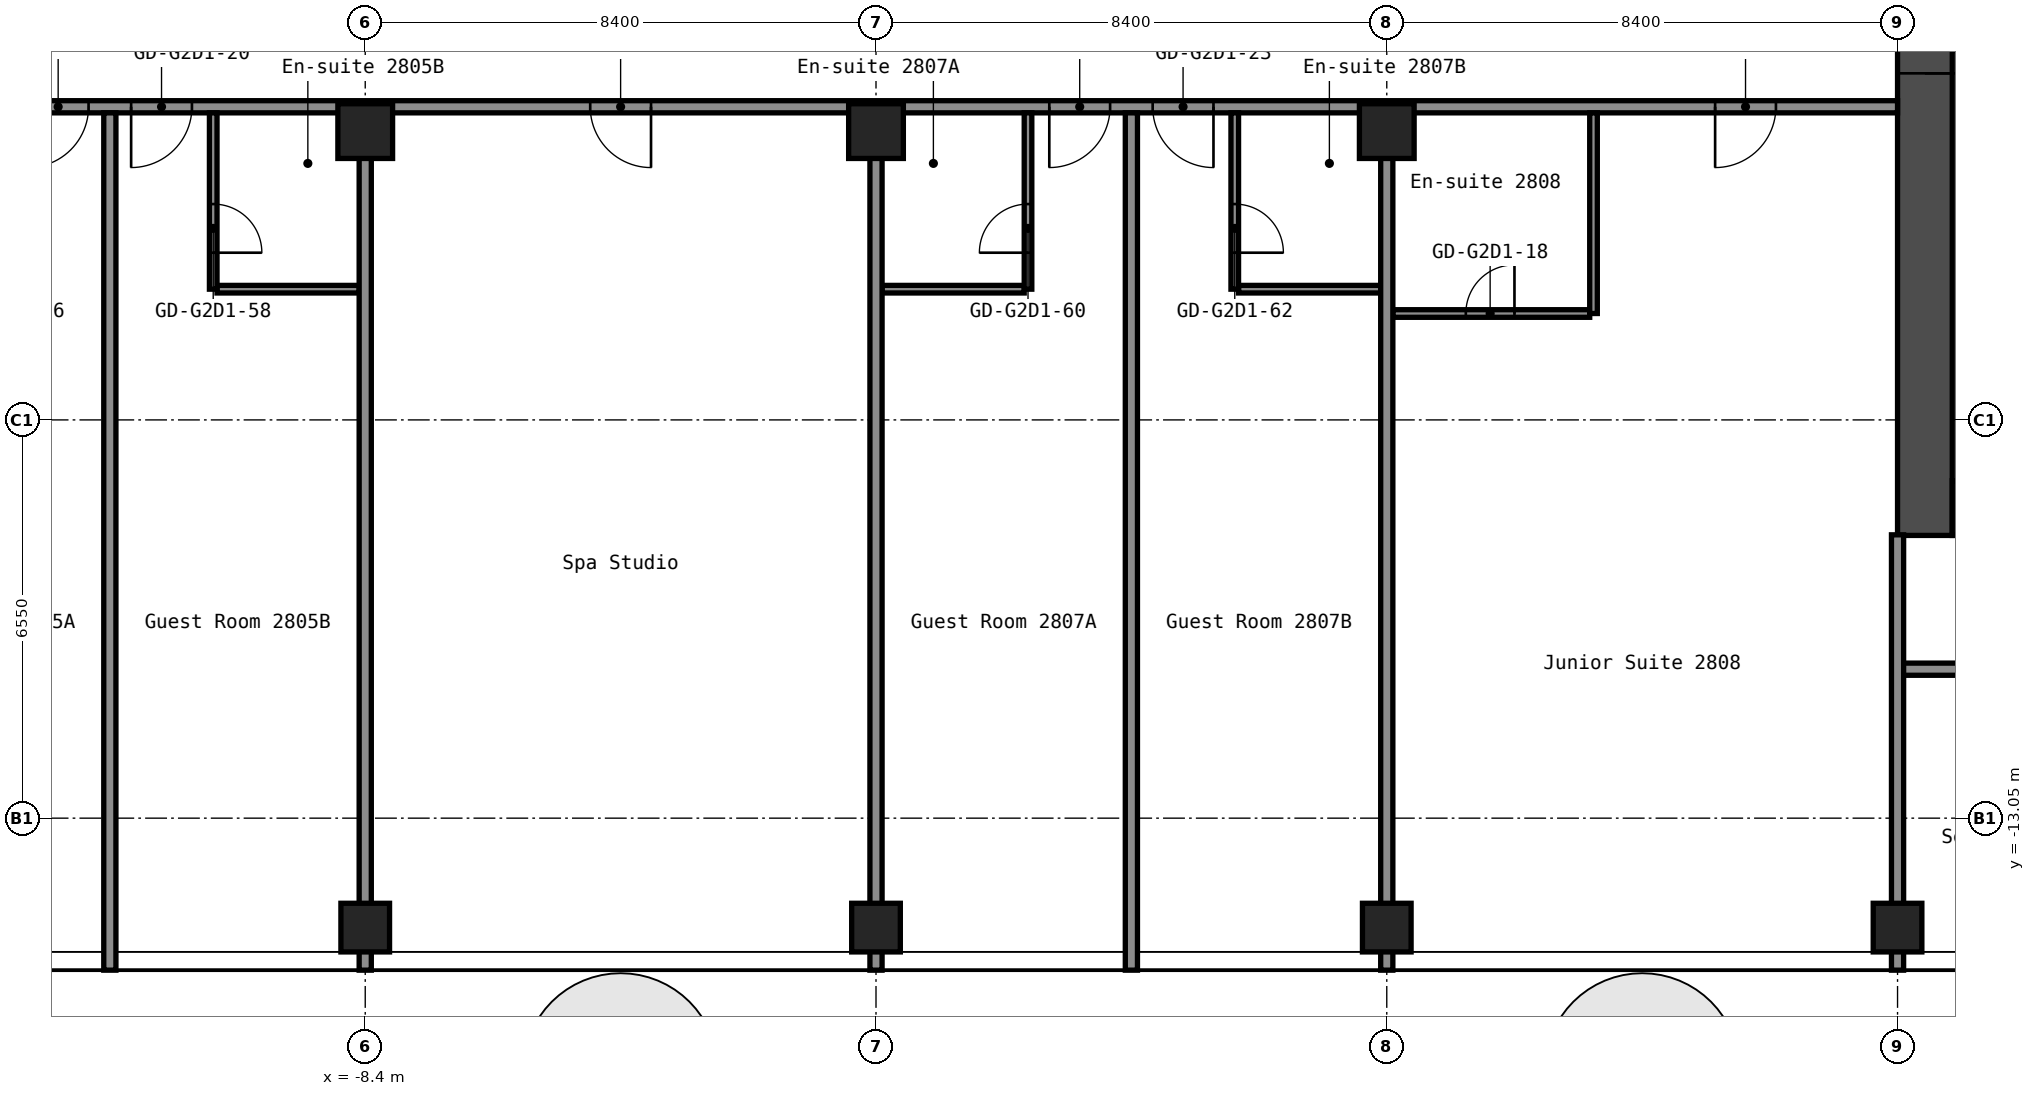
"""IFC4 building model, lengths in metres.
Left out: names, types, materials, properties, quantities, classifications, styles, units other than length and angle.
Written with IfcOpenShell. Run it as: python <this file> out.ifc"""

import sys

from ifc_helpers import new_model, si_unit, direction, frame, frame_2d, origin, origin_2d, place, context, subcontext, project, spatial, rectangle, hollow_rectangle, extrude, element, fill, save


model = new_model("IFC4")
c1 = context("Model", 3, precision=1e-05, world=origin(), true_north=direction((0.0, 1.0)))
c2 = subcontext(c1, "Body", "Model", "MODEL_VIEW")
j1 = project(units=[si_unit("LENGTHUNIT", "METRE"), si_unit("PLANEANGLEUNIT", "RADIAN")], contexts=[c1])
p1 = place(None, origin())
s1 = spatial("IfcSite", under=j1, at=p1, CompositionType="ELEMENT")
p2 = place(p1, origin())
s2 = spatial("IfcBuilding", under=s1, at=p2, CompositionType="ELEMENT")
p3 = place(p2, frame((0.0, 0.0, 101.0)))
s3 = spatial("IfcBuildingStorey", under=s2, at=p3, CompositionType="ELEMENT", Elevation=101.0)
p4 = place(p3, frame((-8.4, -14.85, 0.0), z_axis=(0.0, 0.0, 1.0), x_axis=(1.0, 0.0, 0.0)))
e1 = element("IfcColumn", 1, at=p4, inside=s3, PredefinedType="COLUMN", context=c2, shape_type="SweptSolid", body=[
    extrude(hollow_rectangle(XDim=0.8, YDim=0.8, WallThickness=0.032, at=origin_2d()), origin(), (0.0, 0.0, 1.0), 2.8),
])
p5 = place(p3, frame((-8.4, -1.75, 0.0), z_axis=(0.0, 0.0, 1.0), x_axis=(1.0, 0.0, 0.0)))
e2 = element("IfcColumn", 2, at=p5, inside=s3, PredefinedType="COLUMN", context=c2, shape_type="SweptSolid", body=[
    extrude(hollow_rectangle(XDim=0.9, YDim=0.9, WallThickness=0.036, at=origin_2d()), origin(), (0.0, 0.0, 1.0), 2.8),
])
p6 = place(p3, frame((0.0, -14.85, 0.0), z_axis=(0.0, 0.0, 1.0), x_axis=(1.0, 0.0, 0.0)))
e3 = element("IfcColumn", 3, at=p6, inside=s3, PredefinedType="COLUMN", context=c2, shape_type="SweptSolid", body=[
    extrude(hollow_rectangle(XDim=0.8, YDim=0.8, WallThickness=0.032, at=origin_2d()), origin(), (0.0, 0.0, 1.0), 2.8),
])
p7 = place(p3, frame((0.0, -1.75, 0.0), z_axis=(0.0, 0.0, 1.0), x_axis=(1.0, 0.0, 0.0)))
e4 = element("IfcColumn", 4, at=p7, inside=s3, PredefinedType="COLUMN", context=c2, shape_type="SweptSolid", body=[
    extrude(hollow_rectangle(XDim=0.9, YDim=0.9, WallThickness=0.036, at=origin_2d()), origin(), (0.0, 0.0, 1.0), 2.8),
])
p8 = place(p3, frame((8.4, -14.85, 0.0), z_axis=(0.0, 0.0, 1.0), x_axis=(1.0, 0.0, 0.0)))
e5 = element("IfcColumn", 5, at=p8, inside=s3, PredefinedType="COLUMN", context=c2, shape_type="SweptSolid", body=[
    extrude(hollow_rectangle(XDim=0.8, YDim=0.8, WallThickness=0.032, at=origin_2d()), origin(), (0.0, 0.0, 1.0), 2.8),
])
p9 = place(p3, frame((8.4, -1.75, 0.0), z_axis=(0.0, 0.0, 1.0), x_axis=(1.0, 0.0, 0.0)))
e6 = element("IfcColumn", 6, at=p9, inside=s3, PredefinedType="COLUMN", context=c2, shape_type="SweptSolid", body=[
    extrude(hollow_rectangle(XDim=0.9, YDim=0.9, WallThickness=0.036, at=origin_2d()), origin(), (0.0, 0.0, 1.0), 2.8),
])
p10 = place(p3, frame((16.8, -14.85, 0.0), z_axis=(0.0, 0.0, 1.0), x_axis=(1.0, 0.0, 0.0)))
e7 = element("IfcColumn", 7, at=p10, inside=s3, PredefinedType="COLUMN", context=c2, shape_type="SweptSolid", body=[
    extrude(hollow_rectangle(XDim=0.8, YDim=0.8, WallThickness=0.032, at=origin_2d()), origin(), (0.0, 0.0, 1.0), 2.8),
])
p11 = place(p3, frame((17.25, -8.4, 0.0), z_axis=(0.0, 0.0, 1.0), x_axis=(0.0, 1.0, 0.0)))
e8 = element("IfcWall", 8, at=p11, inside=s3, PredefinedType="SHEAR", context=c2, shape_type="SweptSolid", body=[
    extrude(rectangle(XDim=16.8, YDim=0.9, at=frame_2d((8.4, 0.0))), origin(), (0.0, 0.0, 1.0), 2.8),
])
p12 = place(p11, frame((7.6, 0.0, 0.0)))
e9 = element("IfcOpeningElement", 9, at=p12, cuts=e8, PredefinedType="OPENING", context=c2, shape_type="SweptSolid", body=[
    extrude(rectangle(XDim=1.2, YDim=2.1, at=frame_2d((0.6, 1.05))), frame((0.0, 0.46, 0.0), z_axis=(0.0, -1.0, 0.0), x_axis=(1.0, 0.0, 0.0)), (0.0, 0.0, 1.0), 0.92),
])
p13 = place(p3, frame((17.7, -7.95, 0.0), z_axis=(0.0, 0.0, 1.0), x_axis=(1.0, 0.0, 0.0)))
e10 = element("IfcWall", 10, at=p13, inside=s3, PredefinedType="SHEAR", context=c2, shape_type="SweptSolid", body=[
    extrude(rectangle(XDim=15.0, YDim=0.9, at=frame_2d((7.5, 0.0))), origin(), (0.0, 0.0, 1.0), 2.8),
])
p14 = place(p13, frame((2.55, 0.0, 0.0)))
e11 = element("IfcOpeningElement", 11, at=p14, cuts=e10, PredefinedType="OPENING", context=c2, shape_type="SweptSolid", body=[
    extrude(rectangle(XDim=1.0, YDim=2.1, at=frame_2d((0.5, 1.05))), frame((0.0, 0.46, 0.0), z_axis=(0.0, -1.0, 0.0), x_axis=(1.0, 0.0, 0.0)), (0.0, 0.0, 1.0), 0.92),
])
p15 = place(p3, frame((16.8, -10.6, 0.0), z_axis=(0.0, 0.0, 1.0), x_axis=(1.0, 0.0, 0.0)))
e12 = element("IfcWall", 12, at=p15, inside=s3, PredefinedType="PARTITIONING", context=c2, shape_type="SweptSolid", body=[
    extrude(rectangle(XDim=29.7, YDim=0.2, at=frame_2d((14.85, 0.0))), origin(), (0.0, 0.0, 1.0), 2.8),
])
p16 = place(p15, frame((2.24, 0.0, 0.0)))
e13 = element("IfcOpeningElement", 13, at=p16, cuts=e12, PredefinedType="OPENING", context=c2, shape_type="SweptSolid", body=[
    extrude(rectangle(XDim=0.9, YDim=2.1, at=frame_2d((0.45, 1.05))), frame((0.0, 0.11, 0.0), z_axis=(0.0, -1.0, 0.0), x_axis=(1.0, 0.0, 0.0)), (0.0, 0.0, 1.0), 0.22),
])
p17 = place(p15, frame((6.44, 0.0, 0.0)))
e14 = element("IfcOpeningElement", 14, at=p17, cuts=e12, PredefinedType="OPENING", context=c2, shape_type="SweptSolid", body=[
    extrude(rectangle(XDim=0.9, YDim=2.1, at=frame_2d((0.45, 1.05))), frame((0.0, 0.11, 0.0), z_axis=(0.0, -1.0, 0.0), x_axis=(1.0, 0.0, 0.0)), (0.0, 0.0, 1.0), 0.22),
])
p18 = place(p15, frame((9.8, 0.0, 0.0)))
e15 = element("IfcOpeningElement", 15, at=p18, cuts=e12, PredefinedType="OPENING", context=c2, shape_type="SweptSolid", body=[
    extrude(rectangle(XDim=0.9, YDim=2.1, at=frame_2d((0.45, 1.05))), frame((0.0, 0.11, 0.0), z_axis=(0.0, -1.0, 0.0), x_axis=(1.0, 0.0, 0.0)), (0.0, 0.0, 1.0), 0.22),
])
p19 = place(p15, frame((14.0, 0.0, 0.0)))
e16 = element("IfcOpeningElement", 16, at=p19, cuts=e12, PredefinedType="OPENING", context=c2, shape_type="SweptSolid", body=[
    extrude(rectangle(XDim=0.9, YDim=2.1, at=frame_2d((0.45, 1.05))), frame((0.0, 0.11, 0.0), z_axis=(0.0, -1.0, 0.0), x_axis=(1.0, 0.0, 0.0)), (0.0, 0.0, 1.0), 0.22),
])
p20 = place(p15, frame((17.945, 0.0, 0.0)))
e17 = element("IfcOpeningElement", 17, at=p20, cuts=e12, PredefinedType="OPENING", context=c2, shape_type="SweptSolid", body=[
    extrude(rectangle(XDim=0.9, YDim=2.1, at=frame_2d((0.45, 1.05))), frame((0.0, 0.11, 0.0), z_axis=(0.0, -1.0, 0.0), x_axis=(1.0, 0.0, 0.0)), (0.0, 0.0, 1.0), 0.22),
])
p21 = place(p15, frame((22.145, 0.0, 0.0)))
e18 = element("IfcOpeningElement", 18, at=p21, cuts=e12, PredefinedType="OPENING", context=c2, shape_type="SweptSolid", body=[
    extrude(rectangle(XDim=0.9, YDim=2.1, at=frame_2d((0.45, 1.05))), frame((0.0, 0.11, 0.0), z_axis=(0.0, -1.0, 0.0), x_axis=(1.0, 0.0, 0.0)), (0.0, 0.0, 1.0), 0.22),
])
p22 = place(p15, frame((26.85, 0.0, 0.0)))
e19 = element("IfcOpeningElement", 19, at=p22, cuts=e12, PredefinedType="OPENING", context=c2, shape_type="SweptSolid", body=[
    extrude(rectangle(XDim=0.9, YDim=2.1, at=frame_2d((0.45, 1.05))), frame((0.0, 0.11, 0.0), z_axis=(0.0, -1.0, 0.0), x_axis=(1.0, 0.0, 0.0)), (0.0, 0.0, 1.0), 0.22),
])
p23 = place(p3, frame((8.5, -4.75, 0.0), z_axis=(0.0, 0.0, 1.0), x_axis=(1.0, 0.0, 0.0)))
e20 = element("IfcWall", 20, at=p23, inside=s3, PredefinedType="PARTITIONING", context=c2, shape_type="SweptSolid", body=[
    extrude(rectangle(XDim=3.238, YDim=0.125, at=frame_2d((1.619, 0.0))), origin(), (0.0, 0.0, 1.0), 2.8),
])
p24 = place(p23, frame((1.2, 0.0, 0.0)))
e21 = element("IfcOpeningElement", 21, at=p24, cuts=e20, PredefinedType="OPENING", context=c2, shape_type="SweptSolid", body=[
    extrude(rectangle(XDim=0.8, YDim=2.1, at=frame_2d((0.4, 1.05))), frame((0.0, 0.073, 0.0), z_axis=(0.0, -1.0, 0.0), x_axis=(1.0, 0.0, 0.0)), (0.0, 0.0, 1.0), 0.145),
])
for number, where, z_axis, x_axis in (
    (22, (-10.837, -4.35, 0.0), (0.0, 0.0, 1.0), (1.0, 0.0, 0.0)),
    (23, (0.1, -4.35, 0.0), (0.0, 0.0, 1.0), (1.0, 0.0, 0.0)),
):
    element("IfcWall", number, at=place(p3, frame(where, z_axis=z_axis, x_axis=x_axis)), inside=s3, PredefinedType="PARTITIONING", context=c2, shape_type="SweptSolid", body=[
        extrude(rectangle(XDim=2.337, YDim=0.125, at=frame_2d((1.169, 0.0))), origin(), (0.0, 0.0, 1.0), 2.8),
    ])
p25 = place(p3, frame((5.962, -4.35, 0.0), z_axis=(0.0, 0.0, 1.0), x_axis=(1.0, 0.0, 0.0)))
e24 = element("IfcWall", 24, at=p25, inside=s3, PredefinedType="PARTITIONING", context=c2, shape_type="SweptSolid", body=[
    extrude(rectangle(XDim=2.338, YDim=0.125, at=frame_2d((1.169, 0.0))), origin(), (0.0, 0.0, 1.0), 2.8),
])
p26 = place(p3, frame((-16.8, -1.35, 0.0), z_axis=(0.0, 0.0, 1.0), x_axis=(1.0, 0.0, 0.0)))
e25 = element("IfcWall", 25, at=p26, inside=s3, PredefinedType="PARTITIONING", context=c2, shape_type="SweptSolid", body=[
    extrude(rectangle(XDim=33.6, YDim=0.2, at=frame_2d((16.8, 0.0))), origin(), (0.0, 0.0, 1.0), 2.8),
])
p27 = place(p26, frame((2.85, 0.0, 0.0)))
e26 = element("IfcOpeningElement", 26, at=p27, cuts=e25, PredefinedType="OPENING", context=c2, shape_type="SweptSolid", body=[
    extrude(rectangle(XDim=1.0, YDim=2.1, at=frame_2d((0.5, 1.05))), frame((0.0, 0.11, 0.0), z_axis=(0.0, -1.0, 0.0), x_axis=(1.0, 0.0, 0.0)), (0.0, 0.0, 1.0), 0.22),
])
p28 = place(p26, frame((4.55, 0.0, 0.0)))
e27 = element("IfcOpeningElement", 27, at=p28, cuts=e25, PredefinedType="OPENING", context=c2, shape_type="SweptSolid", body=[
    extrude(rectangle(XDim=1.0, YDim=2.1, at=frame_2d((0.5, 1.05))), frame((0.0, 0.11, 0.0), z_axis=(0.0, -1.0, 0.0), x_axis=(1.0, 0.0, 0.0)), (0.0, 0.0, 1.0), 0.22),
])
p29 = place(p26, frame((12.1, 0.0, 0.0)))
e28 = element("IfcOpeningElement", 28, at=p29, cuts=e25, PredefinedType="OPENING", context=c2, shape_type="SweptSolid", body=[
    extrude(rectangle(XDim=1.0, YDim=2.1, at=frame_2d((0.5, 1.05))), frame((0.0, 0.11, 0.0), z_axis=(0.0, -1.0, 0.0), x_axis=(1.0, 0.0, 0.0)), (0.0, 0.0, 1.0), 0.22),
])
p30 = place(p26, frame((19.65, 0.0, 0.0)))
e29 = element("IfcOpeningElement", 29, at=p30, cuts=e25, PredefinedType="OPENING", context=c2, shape_type="SweptSolid", body=[
    extrude(rectangle(XDim=1.0, YDim=2.1, at=frame_2d((0.5, 1.05))), frame((0.0, 0.11, 0.0), z_axis=(0.0, -1.0, 0.0), x_axis=(1.0, 0.0, 0.0)), (0.0, 0.0, 1.0), 0.22),
])
p31 = place(p26, frame((21.35, 0.0, 0.0)))
e30 = element("IfcOpeningElement", 30, at=p31, cuts=e25, PredefinedType="OPENING", context=c2, shape_type="SweptSolid", body=[
    extrude(rectangle(XDim=1.0, YDim=2.1, at=frame_2d((0.5, 1.05))), frame((0.0, 0.11, 0.0), z_axis=(0.0, -1.0, 0.0), x_axis=(1.0, 0.0, 0.0)), (0.0, 0.0, 1.0), 0.22),
])
p32 = place(p26, frame((30.6, 0.0, 0.0)))
e31 = element("IfcOpeningElement", 31, at=p32, cuts=e25, PredefinedType="OPENING", context=c2, shape_type="SweptSolid", body=[
    extrude(rectangle(XDim=1.0, YDim=2.1, at=frame_2d((0.5, 1.05))), frame((0.0, 0.11, 0.0), z_axis=(0.0, -1.0, 0.0), x_axis=(1.0, 0.0, 0.0)), (0.0, 0.0, 1.0), 0.22),
])
p33 = place(p3, frame((-12.6, -15.55, 0.0), z_axis=(0.0, 0.0, 1.0), x_axis=(0.0, 1.0, 0.0)))
e32 = element("IfcWall", 32, at=p33, inside=s3, PredefinedType="PARTITIONING", context=c2, shape_type="SweptSolid", body=[
    extrude(rectangle(XDim=14.1, YDim=0.2, at=frame_2d((7.05, 0.0))), origin(), (0.0, 0.0, 1.0), 2.8),
])
p34 = place(p3, frame((-10.9, -4.35, 0.0), z_axis=(0.0, 0.0, 1.0), x_axis=(0.0, 1.0, 0.0)))
e33 = element("IfcWall", 33, at=p34, inside=s3, PredefinedType="PARTITIONING", context=c2, shape_type="SweptSolid", body=[
    extrude(rectangle(XDim=2.9, YDim=0.125, at=frame_2d((1.45, 0.0))), origin(), (0.0, 0.0, 1.0), 2.8),
])
p35 = place(p34, frame((0.6, 0.0, 0.0)))
e34 = element("IfcOpeningElement", 34, at=p35, cuts=e33, PredefinedType="OPENING", context=c2, shape_type="SweptSolid", body=[
    extrude(rectangle(XDim=0.8, YDim=2.1, at=frame_2d((0.4, 1.05))), frame((0.0, 0.073, 0.0), z_axis=(0.0, -1.0, 0.0), x_axis=(1.0, 0.0, 0.0)), (0.0, 0.0, 1.0), 0.145),
])
for number, where, z_axis, x_axis in (
    (35, (-8.4, -15.55, 0.0), (0.0, 0.0, 1.0), (0.0, 1.0, 0.0)),
    (36, (0.0, -15.55, 0.0), (0.0, 0.0, 1.0), (0.0, 1.0, 0.0)),
):
    element("IfcWall", number, at=place(p3, frame(where, z_axis=z_axis, x_axis=x_axis)), inside=s3, PredefinedType="PARTITIONING", context=c2, shape_type="SweptSolid", body=[
        extrude(rectangle(XDim=13.36, YDim=0.2, at=frame_2d((6.68, 0.0))), origin(), (0.0, 0.0, 1.0), 2.8),
    ])
p36 = place(p3, frame((2.5, -4.35, 0.0), z_axis=(0.0, 0.0, 1.0), x_axis=(0.0, 1.0, 0.0)))
e37 = element("IfcWall", 37, at=p36, inside=s3, PredefinedType="PARTITIONING", context=c2, shape_type="SweptSolid", body=[
    extrude(rectangle(XDim=2.9, YDim=0.125, at=frame_2d((1.45, 0.0))), origin(), (0.0, 0.0, 1.0), 2.8),
])
p37 = place(p36, frame((0.6, 0.0, 0.0)))
e38 = element("IfcOpeningElement", 38, at=p37, cuts=e37, PredefinedType="OPENING", context=c2, shape_type="SweptSolid", body=[
    extrude(rectangle(XDim=0.8, YDim=2.1, at=frame_2d((0.4, 1.05))), frame((0.0, 0.073, 0.0), z_axis=(0.0, -1.0, 0.0), x_axis=(1.0, 0.0, 0.0)), (0.0, 0.0, 1.0), 0.145),
])
p38 = place(p3, frame((4.2, -15.55, 0.0), z_axis=(0.0, 0.0, 1.0), x_axis=(0.0, 1.0, 0.0)))
e39 = element("IfcWall", 39, at=p38, inside=s3, PredefinedType="PARTITIONING", context=c2, shape_type="SweptSolid", body=[
    extrude(rectangle(XDim=14.1, YDim=0.2, at=frame_2d((7.05, 0.0))), origin(), (0.0, 0.0, 1.0), 2.8),
])
p39 = place(p3, frame((5.9, -4.35, 0.0), z_axis=(0.0, 0.0, 1.0), x_axis=(0.0, 1.0, 0.0)))
e40 = element("IfcWall", 40, at=p39, inside=s3, PredefinedType="PARTITIONING", context=c2, shape_type="SweptSolid", body=[
    extrude(rectangle(XDim=2.9, YDim=0.125, at=frame_2d((1.45, 0.0))), origin(), (0.0, 0.0, 1.0), 2.8),
])
p40 = place(p39, frame((0.6, 0.0, 0.0)))
e41 = element("IfcOpeningElement", 41, at=p40, cuts=e40, PredefinedType="OPENING", context=c2, shape_type="SweptSolid", body=[
    extrude(rectangle(XDim=0.8, YDim=2.1, at=frame_2d((0.4, 1.05))), frame((0.0, 0.073, 0.0), z_axis=(0.0, -1.0, 0.0), x_axis=(1.0, 0.0, 0.0)), (0.0, 0.0, 1.0), 0.145),
])
p41 = place(p3, frame((8.4, -15.55, 0.0), z_axis=(0.0, 0.0, 1.0), x_axis=(0.0, 1.0, 0.0)))
e42 = element("IfcWall", 42, at=p41, inside=s3, PredefinedType="PARTITIONING", context=c2, shape_type="SweptSolid", body=[
    extrude(rectangle(XDim=13.36, YDim=0.2, at=frame_2d((6.68, 0.0))), origin(), (0.0, 0.0, 1.0), 2.8),
])
p42 = place(p3, frame((11.8, -4.75, 0.0), z_axis=(0.0, 0.0, 1.0), x_axis=(0.0, 1.0, 0.0)))
e43 = element("IfcWall", 43, at=p42, inside=s3, PredefinedType="PARTITIONING", context=c2, shape_type="SweptSolid", body=[
    extrude(rectangle(XDim=3.3, YDim=0.125, at=frame_2d((1.65, 0.0))), origin(), (0.0, 0.0, 1.0), 2.8),
])
p43 = place(p3, frame((16.8, -15.55, 0.0), z_axis=(0.0, 0.0, 1.0), x_axis=(0.0, 1.0, 0.0)))
e44 = element("IfcWall", 44, at=p43, inside=s3, PredefinedType="PARTITIONING", context=c2, shape_type="SweptSolid", body=[
    extrude(rectangle(XDim=7.16, YDim=0.2, at=frame_2d((3.58, 0.0))), origin(), (0.0, 0.0, 1.0), 2.8),
])
p44 = place(p12, origin())
e45 = element("IfcDoor", 45, at=p44, inside=s3, OperationType="DOUBLE_DOOR_SINGLE_SWING", PredefinedType="DOOR", context=c2, shape_type="SweptSolid", body=[
    extrude(rectangle(XDim=1.2, YDim=2.1, at=frame_2d((0.6, 1.05))), frame((0.0, 0.025, 0.0), z_axis=(0.0, -1.0, 0.0), x_axis=(1.0, 0.0, 0.0)), (0.0, 0.0, 1.0), 0.05),
])
fill(e9, e45)
p45 = place(p24, origin())
e46 = element("IfcDoor", 46, at=p45, inside=s3, OperationType="SINGLE_SWING_LEFT", PredefinedType="DOOR", context=c2, shape_type="SweptSolid", body=[
    extrude(rectangle(XDim=0.8, YDim=2.1, at=frame_2d((0.4, 1.05))), frame((0.0, 0.025, 0.0), z_axis=(0.0, -1.0, 0.0), x_axis=(1.0, 0.0, 0.0)), (0.0, 0.0, 1.0), 0.05),
])
fill(e21, e46)
p46 = place(p27, origin())
e47 = element("IfcDoor", 47, at=p46, inside=s3, OperationType="SINGLE_SWING_LEFT", PredefinedType="DOOR", context=c2, shape_type="SweptSolid", body=[
    extrude(rectangle(XDim=1.0, YDim=2.1, at=frame_2d((0.5, 1.05))), frame((0.0, 0.025, 0.0), z_axis=(0.0, -1.0, 0.0), x_axis=(1.0, 0.0, 0.0)), (0.0, 0.0, 1.0), 0.05),
])
fill(e26, e47)
p47 = place(p28, origin())
e48 = element("IfcDoor", 48, at=p47, inside=s3, OperationType="SINGLE_SWING_LEFT", PredefinedType="DOOR", context=c2, shape_type="SweptSolid", body=[
    extrude(rectangle(XDim=1.0, YDim=2.1, at=frame_2d((0.5, 1.05))), frame((0.0, 0.025, 0.0), z_axis=(0.0, -1.0, 0.0), x_axis=(1.0, 0.0, 0.0)), (0.0, 0.0, 1.0), 0.05),
])
fill(e27, e48)
p48 = place(p29, origin())
e49 = element("IfcDoor", 49, at=p48, inside=s3, OperationType="SINGLE_SWING_RIGHT", PredefinedType="DOOR", context=c2, shape_type="SweptSolid", body=[
    extrude(rectangle(XDim=1.0, YDim=2.1, at=frame_2d((0.5, 1.05))), frame((0.0, 0.025, 0.0), z_axis=(0.0, -1.0, 0.0), x_axis=(1.0, 0.0, 0.0)), (0.0, 0.0, 1.0), 0.05),
])
fill(e28, e49)
p49 = place(p30, origin())
e50 = element("IfcDoor", 50, at=p49, inside=s3, OperationType="SINGLE_SWING_LEFT", PredefinedType="DOOR", context=c2, shape_type="SweptSolid", body=[
    extrude(rectangle(XDim=1.0, YDim=2.1, at=frame_2d((0.5, 1.05))), frame((0.0, 0.025, 0.0), z_axis=(0.0, -1.0, 0.0), x_axis=(1.0, 0.0, 0.0)), (0.0, 0.0, 1.0), 0.05),
])
fill(e29, e50)
p50 = place(p31, origin())
e51 = element("IfcDoor", 51, at=p50, inside=s3, OperationType="SINGLE_SWING_RIGHT", PredefinedType="DOOR", context=c2, shape_type="SweptSolid", body=[
    extrude(rectangle(XDim=1.0, YDim=2.1, at=frame_2d((0.5, 1.05))), frame((0.0, 0.025, 0.0), z_axis=(0.0, -1.0, 0.0), x_axis=(1.0, 0.0, 0.0)), (0.0, 0.0, 1.0), 0.05),
])
fill(e30, e51)
p51 = place(p32, origin())
e52 = element("IfcDoor", 52, at=p51, inside=s3, OperationType="SINGLE_SWING_LEFT", PredefinedType="DOOR", context=c2, shape_type="SweptSolid", body=[
    extrude(rectangle(XDim=1.0, YDim=2.1, at=frame_2d((0.5, 1.05))), frame((0.0, 0.025, 0.0), z_axis=(0.0, -1.0, 0.0), x_axis=(1.0, 0.0, 0.0)), (0.0, 0.0, 1.0), 0.05),
])
fill(e31, e52)
p52 = place(p35, origin())
e53 = element("IfcDoor", 53, at=p52, inside=s3, OperationType="SINGLE_SWING_LEFT", PredefinedType="DOOR", context=c2, shape_type="SweptSolid", body=[
    extrude(rectangle(XDim=0.8, YDim=2.1, at=frame_2d((0.4, 1.05))), frame((0.0, 0.025, 0.0), z_axis=(0.0, -1.0, 0.0), x_axis=(1.0, 0.0, 0.0)), (0.0, 0.0, 1.0), 0.05),
])
fill(e34, e53)
p53 = place(p37, origin())
e54 = element("IfcDoor", 54, at=p53, inside=s3, OperationType="SINGLE_SWING_RIGHT", PredefinedType="DOOR", context=c2, shape_type="SweptSolid", body=[
    extrude(rectangle(XDim=0.8, YDim=2.1, at=frame_2d((0.4, 1.05))), frame((0.0, 0.025, 0.0), z_axis=(0.0, -1.0, 0.0), x_axis=(1.0, 0.0, 0.0)), (0.0, 0.0, 1.0), 0.05),
])
fill(e38, e54)
p54 = place(p40, origin())
e55 = element("IfcDoor", 55, at=p54, inside=s3, OperationType="SINGLE_SWING_LEFT", PredefinedType="DOOR", context=c2, shape_type="SweptSolid", body=[
    extrude(rectangle(XDim=0.8, YDim=2.1, at=frame_2d((0.4, 1.05))), frame((0.0, 0.025, 0.0), z_axis=(0.0, -1.0, 0.0), x_axis=(1.0, 0.0, 0.0)), (0.0, 0.0, 1.0), 0.05),
])
fill(e41, e55)
save(model, sys.argv[1])
